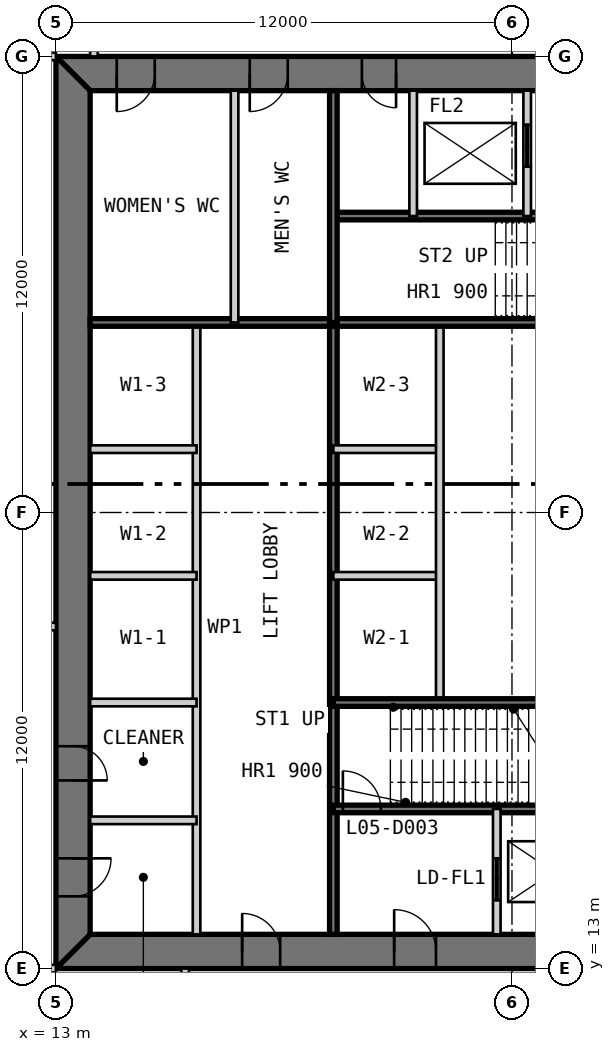
"""IFC4 building model, lengths in metres.
Left out: names, types, materials, properties, quantities, classifications, styles, units other than length and angle.
Written with IfcOpenShell. Run it as: python <this file> out.ifc"""

import sys

from ifc_helpers import new_model, si_unit, direction, frame, frame_2d, origin, place, context, subcontext, project, spatial, polyline, rectangle, outline, extrude, element, fill, save


model = new_model("IFC4")
c1 = context("Model", 3, precision=1e-05, world=origin(), true_north=direction((0.0, 1.0)))
c2 = subcontext(c1, "Body", "Model", "MODEL_VIEW")
j1 = project(units=[si_unit("LENGTHUNIT", "METRE"), si_unit("PLANEANGLEUNIT", "RADIAN")], contexts=[c1])
p1 = place(None, origin())
s1 = spatial("IfcSite", under=j1, at=p1, CompositionType="ELEMENT")
p2 = place(p1, origin())
s2 = spatial("IfcBuilding", under=s1, at=p2, CompositionType="ELEMENT")
p3 = place(p2, frame((0.0, 0.0, 26.2)))
s3 = spatial("IfcBuildingStorey", under=s2, at=p3, CompositionType="ELEMENT", Elevation=26.2)
p4 = place(p3, frame((13.0, 13.45, 0.0), z_axis=(0.0, 0.0, 1.0), x_axis=(1.0, 0.0, 0.0)))
e1 = element("IfcWall", 1, at=p4, inside=s3, PredefinedType="SHEAR", context=c2, shape_type="SweptSolid", body=[
    extrude(outline(polyline([(0.0, -0.45), (24.0, -0.45), (23.1, 0.45), (0.9, 0.45), (0.0, -0.45)])), origin(), (0.0, 0.0, 1.0), 4.8),
])
p5 = place(p4, frame((4.9, 0.0, 0.0)))
e2 = element("IfcOpeningElement", 2, at=p5, cuts=e1, PredefinedType="OPENING", context=c2, shape_type="SweptSolid", body=[
    extrude(rectangle(XDim=1.0, YDim=2.2, at=frame_2d((0.5, 1.1))), frame((0.0, 0.46, 0.0), z_axis=(0.0, -1.0, 0.0), x_axis=(1.0, 0.0, 0.0)), (0.0, 0.0, 1.0), 0.92),
])
p6 = place(p4, frame((8.9, 0.0, 0.0)))
e3 = element("IfcOpeningElement", 3, at=p6, cuts=e1, PredefinedType="OPENING", context=c2, shape_type="SweptSolid", body=[
    extrude(rectangle(XDim=1.1, YDim=2.2, at=frame_2d((0.55, 1.1))), frame((0.0, 0.46, 0.0), z_axis=(0.0, -1.0, 0.0), x_axis=(1.0, 0.0, 0.0)), (0.0, 0.0, 1.0), 0.92),
])
p7 = place(p4, frame((15.05, 0.0, 0.0)))
e4 = element("IfcOpeningElement", 4, at=p7, cuts=e1, PredefinedType="OPENING", context=c2, shape_type="SweptSolid", body=[
    extrude(rectangle(XDim=0.9, YDim=2.2, at=frame_2d((0.45, 1.1))), frame((0.0, 0.46, 0.0), z_axis=(0.0, -1.0, 0.0), x_axis=(1.0, 0.0, 0.0)), (0.0, 0.0, 1.0), 0.92),
])
p8 = place(p4, frame((17.9, 0.0, 0.0)))
e5 = element("IfcOpeningElement", 5, at=p8, cuts=e1, PredefinedType="OPENING", context=c2, shape_type="SweptSolid", body=[
    extrude(rectangle(XDim=1.0, YDim=2.2, at=frame_2d((0.5, 1.1))), frame((0.0, 0.46, 0.0), z_axis=(0.0, -1.0, 0.0), x_axis=(1.0, 0.0, 0.0)), (0.0, 0.0, 1.0), 0.92),
])
p9 = place(p4, frame((21.4, 0.0, 0.0)))
e6 = element("IfcOpeningElement", 6, at=p9, cuts=e1, PredefinedType="OPENING", context=c2, shape_type="SweptSolid", body=[
    extrude(rectangle(XDim=1.0, YDim=2.2, at=frame_2d((0.5, 1.1))), frame((0.0, 0.46, 0.0), z_axis=(0.0, -1.0, 0.0), x_axis=(1.0, 0.0, 0.0)), (0.0, 0.0, 1.0), 0.92),
])
p10 = place(p3, frame((37.0, 36.55, 0.0), z_axis=(0.0, 0.0, 1.0), x_axis=(-1.0, 0.0, 0.0)))
e7 = element("IfcWall", 7, at=p10, inside=s3, PredefinedType="SHEAR", context=c2, shape_type="SweptSolid", body=[
    extrude(outline(polyline([(0.0, -0.45), (24.0, -0.45), (23.1, 0.45), (0.9, 0.45), (0.0, -0.45)])), origin(), (0.0, 0.0, 1.0), 4.8),
])
p11 = place(p10, frame((4.9, 0.0, 0.0)))
e8 = element("IfcOpeningElement", 8, at=p11, cuts=e7, PredefinedType="OPENING", context=c2, shape_type="SweptSolid", body=[
    extrude(rectangle(XDim=1.0, YDim=2.2, at=frame_2d((0.5, 1.1))), frame((0.0, 0.46, 0.0), z_axis=(0.0, -1.0, 0.0), x_axis=(1.0, 0.0, 0.0)), (0.0, 0.0, 1.0), 0.92),
])
p12 = place(p10, frame((8.9, 0.0, 0.0)))
e9 = element("IfcOpeningElement", 9, at=p12, cuts=e7, PredefinedType="OPENING", context=c2, shape_type="SweptSolid", body=[
    extrude(rectangle(XDim=1.1, YDim=2.2, at=frame_2d((0.55, 1.1))), frame((0.0, 0.46, 0.0), z_axis=(0.0, -1.0, 0.0), x_axis=(1.0, 0.0, 0.0)), (0.0, 0.0, 1.0), 0.92),
])
p13 = place(p10, frame((15.05, 0.0, 0.0)))
e10 = element("IfcOpeningElement", 10, at=p13, cuts=e7, PredefinedType="OPENING", context=c2, shape_type="SweptSolid", body=[
    extrude(rectangle(XDim=0.9, YDim=2.2, at=frame_2d((0.45, 1.1))), frame((0.0, 0.46, 0.0), z_axis=(0.0, -1.0, 0.0), x_axis=(1.0, 0.0, 0.0)), (0.0, 0.0, 1.0), 0.92),
])
p14 = place(p10, frame((17.9, 0.0, 0.0)))
e11 = element("IfcOpeningElement", 11, at=p14, cuts=e7, PredefinedType="OPENING", context=c2, shape_type="SweptSolid", body=[
    extrude(rectangle(XDim=1.0, YDim=2.2, at=frame_2d((0.5, 1.1))), frame((0.0, 0.46, 0.0), z_axis=(0.0, -1.0, 0.0), x_axis=(1.0, 0.0, 0.0)), (0.0, 0.0, 1.0), 0.92),
])
p15 = place(p10, frame((21.4, 0.0, 0.0)))
e12 = element("IfcOpeningElement", 12, at=p15, cuts=e7, PredefinedType="OPENING", context=c2, shape_type="SweptSolid", body=[
    extrude(rectangle(XDim=1.0, YDim=2.2, at=frame_2d((0.5, 1.1))), frame((0.0, 0.46, 0.0), z_axis=(0.0, -1.0, 0.0), x_axis=(1.0, 0.0, 0.0)), (0.0, 0.0, 1.0), 0.92),
])
p16 = place(p3, frame((13.45, 36.1, 0.0), z_axis=(0.0, 0.0, 1.0), x_axis=(0.0, -1.0, 0.0)))
e13 = element("IfcWall", 13, at=p16, inside=s3, PredefinedType="SHEAR", context=c2, shape_type="SweptSolid", body=[
    extrude(outline(polyline([(-0.9, -0.45), (23.1, -0.45), (22.2, 0.45), (0.0, 0.45), (-0.9, -0.45)])), origin(), (0.0, 0.0, 1.0), 4.8),
])
p17 = place(p16, frame((20.2, 0.0, 0.0)))
e14 = element("IfcOpeningElement", 14, at=p17, cuts=e13, PredefinedType="OPENING", context=c2, shape_type="SweptSolid", body=[
    extrude(rectangle(XDim=1.0, YDim=2.2, at=frame_2d((0.5, 1.1))), frame((0.0, 0.46, 0.0), z_axis=(0.0, -1.0, 0.0), x_axis=(1.0, 0.0, 0.0)), (0.0, 0.0, 1.0), 0.92),
])
p18 = place(p16, frame((17.25, 0.0, 0.0)))
e15 = element("IfcOpeningElement", 15, at=p18, cuts=e13, PredefinedType="OPENING", context=c2, shape_type="SweptSolid", body=[
    extrude(rectangle(XDim=0.9, YDim=2.2, at=frame_2d((0.45, 1.1))), frame((0.0, 0.46, 0.0), z_axis=(0.0, -1.0, 0.0), x_axis=(1.0, 0.0, 0.0)), (0.0, 0.0, 1.0), 0.92),
])
p19 = place(p3, frame((16.7, 13.9, 0.0), z_axis=(0.0, 0.0, 1.0), x_axis=(0.0, 1.0, 0.0)))
e16 = element("IfcWall", 16, at=p19, inside=s3, PredefinedType="PARTITIONING", context=c2, shape_type="SweptSolid", body=[
    extrude(rectangle(XDim=16.1, YDim=0.2, at=frame_2d((8.05, 0.0))), origin(), (0.0, 0.0, 1.0), 4.6),
])
p20 = place(p3, frame((20.3, 13.9, 0.0), z_axis=(0.0, 0.0, 1.0), x_axis=(0.0, 1.0, 0.0)))
e17 = element("IfcWall", 17, at=p20, inside=s3, PredefinedType="SOLIDWALL", context=c2, shape_type="SweptSolid", body=[
    extrude(rectangle(XDim=16.1, YDim=0.2, at=frame_2d((8.05, 0.0))), origin(), (0.0, 0.0, 1.0), 4.6),
])
for number, where, z_axis, x_axis in (
    (18, (13.9, 20.0, 0.0), (0.0, 0.0, 1.0), (1.0, 0.0, 0.0)),
    (19, (13.9, 23.333, 0.0), (0.0, 0.0, 1.0), (1.0, 0.0, 0.0)),
    (20, (13.9, 26.667, 0.0), (0.0, 0.0, 1.0), (1.0, 0.0, 0.0)),
    (21, (20.3, 23.333, 0.0), (0.0, 0.0, 1.0), (1.0, 0.0, 0.0)),
    (22, (20.3, 26.667, 0.0), (0.0, 0.0, 1.0), (1.0, 0.0, 0.0)),
):
    element("IfcWall", number, at=place(p3, frame(where, z_axis=z_axis, x_axis=x_axis)), inside=s3, PredefinedType="PARTITIONING", context=c2, shape_type="SweptSolid", body=[
        extrude(rectangle(XDim=2.8, YDim=0.2, at=frame_2d((1.4, 0.0))), origin(), (0.0, 0.0, 1.0), 4.6),
    ])
p21 = place(p3, frame((23.1, 20.0, 0.0), z_axis=(0.0, 0.0, 1.0), x_axis=(0.0, 1.0, 0.0)))
e23 = element("IfcWall", 23, at=p21, inside=s3, PredefinedType="PARTITIONING", context=c2, shape_type="SweptSolid", body=[
    extrude(rectangle(XDim=10.0, YDim=0.2, at=frame_2d((5.0, 0.0))), origin(), (0.0, 0.0, 1.0), 4.6),
])
p22 = place(p3, frame((20.3, 17.2, 0.0), z_axis=(0.0, 0.0, 1.0), x_axis=(1.0, 0.0, 0.0)))
e24 = element("IfcWall", 24, at=p22, inside=s3, PredefinedType="SOLIDWALL", context=c2, shape_type="SweptSolid", body=[
    extrude(rectangle(XDim=9.4, YDim=0.2, at=frame_2d((4.7, 0.0))), origin(), (0.0, 0.0, 1.0), 4.6),
])
p23 = place(p22, frame((0.25, 0.0, 0.0)))
e25 = element("IfcOpeningElement", 25, at=p23, cuts=e24, PredefinedType="OPENING", context=c2, shape_type="SweptSolid", body=[
    extrude(rectangle(XDim=1.0, YDim=2.2, at=frame_2d((0.5, 1.1))), frame((0.0, 0.11, 0.0), z_axis=(0.0, -1.0, 0.0), x_axis=(1.0, 0.0, 0.0)), (0.0, 0.0, 1.0), 0.22),
])
p24 = place(p3, frame((20.3, 20.0, 0.0), z_axis=(0.0, 0.0, 1.0), x_axis=(1.0, 0.0, 0.0)))
e26 = element("IfcWall", 26, at=p24, inside=s3, PredefinedType="SOLIDWALL", context=c2, shape_type="SweptSolid", body=[
    extrude(rectangle(XDim=15.8, YDim=0.2, at=frame_2d((7.9, 0.0))), origin(), (0.0, 0.0, 1.0), 4.6),
])
p25 = place(p3, frame((24.6, 13.9, 0.0), z_axis=(0.0, 0.0, 1.0), x_axis=(0.0, 1.0, 0.0)))
e27 = element("IfcWall", 27, at=p25, inside=s3, PredefinedType="PARTITIONING", context=c2, shape_type="SweptSolid", body=[
    extrude(rectangle(XDim=3.3, YDim=0.2, at=frame_2d((1.65, 0.0))), origin(), (0.0, 0.0, 1.0), 4.6),
])
p26 = place(p25, frame((0.9, 0.0, 0.0)))
e28 = element("IfcOpeningElement", 28, at=p26, cuts=e27, PredefinedType="OPENING", context=c2, shape_type="SweptSolid", body=[
    extrude(rectangle(XDim=1.1, YDim=2.2, at=frame_2d((0.55, 1.1))), frame((0.0, 0.11, 0.0), z_axis=(0.0, -1.0, 0.0), x_axis=(1.0, 0.0, 0.0)), (0.0, 0.0, 1.0), 0.22),
])
p27 = place(p3, frame((13.9, 16.9, 0.0), z_axis=(0.0, 0.0, 1.0), x_axis=(1.0, 0.0, 0.0)))
e29 = element("IfcWall", 29, at=p27, inside=s3, PredefinedType="PARTITIONING", context=c2, shape_type="SweptSolid", body=[
    extrude(rectangle(XDim=2.8, YDim=0.2, at=frame_2d((1.4, 0.0))), origin(), (0.0, 0.0, 1.0), 4.6),
])
p28 = place(p3, frame((29.7, 32.8, 0.0), z_axis=(0.0, 0.0, 1.0), x_axis=(-1.0, 0.0, 0.0)))
e30 = element("IfcWall", 30, at=p28, inside=s3, PredefinedType="SOLIDWALL", context=c2, shape_type="SweptSolid", body=[
    extrude(rectangle(XDim=9.4, YDim=0.2, at=frame_2d((4.7, 0.0))), origin(), (0.0, 0.0, 1.0), 4.6),
])
p29 = place(p28, frame((0.25, 0.0, 0.0)))
e31 = element("IfcOpeningElement", 31, at=p29, cuts=e30, PredefinedType="OPENING", context=c2, shape_type="SweptSolid", body=[
    extrude(rectangle(XDim=1.0, YDim=2.2, at=frame_2d((0.5, 1.1))), frame((0.0, 0.11, 0.0), z_axis=(0.0, -1.0, 0.0), x_axis=(1.0, 0.0, 0.0)), (0.0, 0.0, 1.0), 0.22),
])
p30 = place(p3, frame((29.7, 30.0, 0.0), z_axis=(0.0, 0.0, 1.0), x_axis=(-1.0, 0.0, 0.0)))
e32 = element("IfcWall", 32, at=p30, inside=s3, PredefinedType="SOLIDWALL", context=c2, shape_type="SweptSolid", body=[
    extrude(rectangle(XDim=15.8, YDim=0.2, at=frame_2d((7.9, 0.0))), origin(), (0.0, 0.0, 1.0), 4.6),
])
p31 = place(p3, frame((25.4, 36.1, 0.0), z_axis=(0.0, 0.0, 1.0), x_axis=(0.0, -1.0, 0.0)))
e33 = element("IfcWall", 33, at=p31, inside=s3, PredefinedType="PARTITIONING", context=c2, shape_type="SweptSolid", body=[
    extrude(rectangle(XDim=3.3, YDim=0.2, at=frame_2d((1.65, 0.0))), origin(), (0.0, 0.0, 1.0), 4.6),
])
p32 = place(p31, frame((0.9, 0.0, 0.0)))
e34 = element("IfcOpeningElement", 34, at=p32, cuts=e33, PredefinedType="OPENING", context=c2, shape_type="SweptSolid", body=[
    extrude(rectangle(XDim=1.1, YDim=2.2, at=frame_2d((0.55, 1.1))), frame((0.0, 0.11, 0.0), z_axis=(0.0, -1.0, 0.0), x_axis=(1.0, 0.0, 0.0)), (0.0, 0.0, 1.0), 0.22),
])
p33 = place(p3, frame((22.4, 36.1, 0.0), z_axis=(0.0, 0.0, 1.0), x_axis=(0.0, -1.0, 0.0)))
e35 = element("IfcWall", 35, at=p33, inside=s3, PredefinedType="PARTITIONING", context=c2, shape_type="SweptSolid", body=[
    extrude(rectangle(XDim=3.3, YDim=0.2, at=frame_2d((1.65, 0.0))), origin(), (0.0, 0.0, 1.0), 4.6),
])
p34 = place(p3, frame((20.3, 36.1, 0.0), z_axis=(0.0, 0.0, 1.0), x_axis=(0.0, -1.0, 0.0)))
e36 = element("IfcWall", 36, at=p34, inside=s3, PredefinedType="SOLIDWALL", context=c2, shape_type="SweptSolid", body=[
    extrude(rectangle(XDim=6.1, YDim=0.2, at=frame_2d((3.05, 0.0))), origin(), (0.0, 0.0, 1.0), 4.6),
])
p35 = place(p3, frame((17.7, 36.1, 0.0), z_axis=(0.0, 0.0, 1.0), x_axis=(0.0, -1.0, 0.0)))
e37 = element("IfcWall", 37, at=p35, inside=s3, PredefinedType="PARTITIONING", context=c2, shape_type="SweptSolid", body=[
    extrude(rectangle(XDim=6.1, YDim=0.2, at=frame_2d((3.05, 0.0))), origin(), (0.0, 0.0, 1.0), 4.6),
])
p36 = place(p3, frame((14.0, 37.0, 0.0), z_axis=(0.0, 0.0, 1.0), x_axis=(0.0, 1.0, 0.0)))
e38 = element("IfcWall", 38, at=p36, inside=s3, PredefinedType="PARTITIONING", context=c2, shape_type="SweptSolid", body=[
    extrude(rectangle(XDim=6.0, YDim=0.2, at=frame_2d((3.0, 0.0))), origin(), (0.0, 0.0, 1.0), 4.5),
])
p37 = place(p36, frame((2.55, 0.0, 0.0)))
e39 = element("IfcOpeningElement", 39, at=p37, cuts=e38, PredefinedType="OPENING", context=c2, shape_type="SweptSolid", body=[
    extrude(rectangle(XDim=0.9, YDim=2.2, at=frame_2d((0.45, 1.1))), frame((0.0, 0.11, 0.0), z_axis=(0.0, -1.0, 0.0), x_axis=(1.0, 0.0, 0.0)), (0.0, 0.0, 1.0), 0.22),
])
p38 = place(p3, frame((16.4, 7.0, 0.0), z_axis=(0.0, 0.0, 1.0), x_axis=(0.0, 1.0, 0.0)))
e40 = element("IfcWall", 40, at=p38, inside=s3, PredefinedType="PARTITIONING", context=c2, shape_type="SweptSolid", body=[
    extrude(rectangle(XDim=6.0, YDim=0.2, at=frame_2d((3.0, 0.0))), origin(), (0.0, 0.0, 1.0), 4.5),
])
p39 = place(p3, frame((7.0, 13.0, 0.0), z_axis=(0.0, 0.0, 1.0), x_axis=(1.0, 0.0, 0.0)))
e41 = element("IfcWall", 41, at=p39, inside=s3, PredefinedType="PARTITIONING", context=c2, shape_type="SweptSolid", body=[
    extrude(rectangle(XDim=6.0, YDim=0.2, at=frame_2d((3.0, 0.0))), origin(), (0.0, 0.0, 1.0), 3.703),
])
p40 = place(p3, frame((7.0, 22.0, 0.0), z_axis=(0.0, 0.0, 1.0), x_axis=(1.0, 0.0, 0.0)))
e42 = element("IfcWall", 42, at=p40, inside=s3, PredefinedType="PARTITIONING", context=c2, shape_type="SweptSolid", body=[
    extrude(rectangle(XDim=6.0, YDim=0.2, at=frame_2d((3.0, 0.0))), origin(), (0.0, 0.0, 1.0), 4.5),
])
p41 = place(p40, frame((2.1, 0.0, 0.0)))
e43 = element("IfcOpeningElement", 43, at=p41, cuts=e42, PredefinedType="OPENING", context=c2, shape_type="SweptSolid", body=[
    extrude(rectangle(XDim=1.8, YDim=2.4, at=frame_2d((0.9, 1.2))), frame((0.0, 0.11, 0.0), z_axis=(0.0, -1.0, 0.0), x_axis=(1.0, 0.0, 0.0)), (0.0, 0.0, 1.0), 0.22),
])
p42 = place(p3, frame((7.0, 37.0, 0.0), z_axis=(0.0, 0.0, 1.0), x_axis=(1.0, 0.0, 0.0)))
e44 = element("IfcWall", 44, at=p42, inside=s3, PredefinedType="PARTITIONING", context=c2, shape_type="SweptSolid", body=[
    extrude(rectangle(XDim=6.0, YDim=0.2, at=frame_2d((3.0, 0.0))), origin(), (0.0, 0.0, 1.0), 3.703),
])
p43 = place(p5, origin())
e45 = element("IfcDoor", 45, at=p43, inside=s3, OperationType="SINGLE_SWING_LEFT", PredefinedType="DOOR", context=c2, shape_type="SweptSolid", body=[
    extrude(rectangle(XDim=1.0, YDim=2.2, at=frame_2d((0.5, 1.1))), frame((0.0, 0.025, 0.0), z_axis=(0.0, -1.0, 0.0), x_axis=(1.0, 0.0, 0.0)), (0.0, 0.0, 1.0), 0.05),
    extrude(outline(polyline([(0.0, 0.0), (0.04, 0.0), (0.04, 2.16), (0.96, 2.16), (0.96, 0.0), (1.0, 0.0), (1.0, 2.2), (0.0, 2.2), (0.0, 0.0)])), frame((0.0, 0.3, 0.0), z_axis=(0.0, -1.0, 0.0), x_axis=(1.0, 0.0, 0.0)), (0.0, 0.0, 1.0), 0.6),
])
fill(e2, e45)
p44 = place(p6, origin())
e46 = element("IfcDoor", 46, at=p44, inside=s3, OperationType="SINGLE_SWING_LEFT", PredefinedType="DOOR", context=c2, shape_type="SweptSolid", body=[
    extrude(rectangle(XDim=1.1, YDim=2.2, at=frame_2d((0.55, 1.1))), frame((0.0, 0.025, 0.0), z_axis=(0.0, -1.0, 0.0), x_axis=(1.0, 0.0, 0.0)), (0.0, 0.0, 1.0), 0.05),
    extrude(outline(polyline([(0.0, 0.0), (0.04, 0.0), (0.04, 2.16), (1.06, 2.16), (1.06, 0.0), (1.1, 0.0), (1.1, 2.2), (0.0, 2.2), (0.0, 0.0)])), frame((0.0, 0.3, 0.0), z_axis=(0.0, -1.0, 0.0), x_axis=(1.0, 0.0, 0.0)), (0.0, 0.0, 1.0), 0.6),
])
fill(e3, e46)
p45 = place(p23, origin())
e47 = element("IfcDoor", 47, at=p45, inside=s3, OperationType="SINGLE_SWING_LEFT", PredefinedType="DOOR", context=c2, shape_type="SweptSolid", body=[
    extrude(rectangle(XDim=1.0, YDim=2.2, at=frame_2d((0.5, 1.1))), frame((0.0, 0.025, 0.0), z_axis=(0.0, -1.0, 0.0), x_axis=(1.0, 0.0, 0.0)), (0.0, 0.0, 1.0), 0.05),
])
fill(e25, e47)
p46 = place(p17, origin())
e48 = element("IfcDoor", 48, at=p46, inside=s3, OperationType="SINGLE_SWING_LEFT", PredefinedType="DOOR", context=c2, shape_type="SweptSolid", body=[
    extrude(rectangle(XDim=1.0, YDim=2.2, at=frame_2d((0.5, 1.1))), frame((0.0, 0.025, 0.0), z_axis=(0.0, -1.0, 0.0), x_axis=(1.0, 0.0, 0.0)), (0.0, 0.0, 1.0), 0.05),
    extrude(outline(polyline([(0.0, 0.0), (0.04, 0.0), (0.04, 2.16), (0.96, 2.16), (0.96, 0.0), (1.0, 0.0), (1.0, 2.2), (0.0, 2.2), (0.0, 0.0)])), frame((0.0, 0.3, 0.0), z_axis=(0.0, -1.0, 0.0), x_axis=(1.0, 0.0, 0.0)), (0.0, 0.0, 1.0), 0.6),
])
fill(e14, e48)
p47 = place(p18, origin())
e49 = element("IfcDoor", 49, at=p47, inside=s3, OperationType="SINGLE_SWING_RIGHT", PredefinedType="DOOR", context=c2, shape_type="SweptSolid", body=[
    extrude(rectangle(XDim=0.9, YDim=2.2, at=frame_2d((0.45, 1.1))), frame((0.0, 0.025, 0.0), z_axis=(0.0, -1.0, 0.0), x_axis=(1.0, 0.0, 0.0)), (0.0, 0.0, 1.0), 0.05),
    extrude(outline(polyline([(0.0, 0.0), (0.04, 0.0), (0.04, 2.16), (0.86, 2.16), (0.86, 0.0), (0.9, 0.0), (0.9, 2.2), (0.0, 2.2), (0.0, 0.0)])), frame((0.0, 0.3, 0.0), z_axis=(0.0, -1.0, 0.0), x_axis=(1.0, 0.0, 0.0)), (0.0, 0.0, 1.0), 0.6),
])
fill(e15, e49)
p48 = place(p13, origin())
e50 = element("IfcDoor", 50, at=p48, inside=s3, OperationType="SINGLE_SWING_LEFT", PredefinedType="DOOR", context=c2, shape_type="SweptSolid", body=[
    extrude(rectangle(XDim=0.9, YDim=2.2, at=frame_2d((0.45, 1.1))), frame((0.0, 0.025, 0.0), z_axis=(0.0, -1.0, 0.0), x_axis=(1.0, 0.0, 0.0)), (0.0, 0.0, 1.0), 0.05),
    extrude(outline(polyline([(0.0, 0.0), (0.04, 0.0), (0.04, 2.16), (0.86, 2.16), (0.86, 0.0), (0.9, 0.0), (0.9, 2.2), (0.0, 2.2), (0.0, 0.0)])), frame((0.0, 0.3, 0.0), z_axis=(0.0, -1.0, 0.0), x_axis=(1.0, 0.0, 0.0)), (0.0, 0.0, 1.0), 0.6),
])
fill(e10, e50)
p49 = place(p14, origin())
e51 = element("IfcDoor", 51, at=p49, inside=s3, OperationType="SINGLE_SWING_RIGHT", PredefinedType="DOOR", context=c2, shape_type="SweptSolid", body=[
    extrude(rectangle(XDim=1.0, YDim=2.2, at=frame_2d((0.5, 1.1))), frame((0.0, 0.025, 0.0), z_axis=(0.0, -1.0, 0.0), x_axis=(1.0, 0.0, 0.0)), (0.0, 0.0, 1.0), 0.05),
    extrude(outline(polyline([(0.0, 0.0), (0.04, 0.0), (0.04, 2.16), (0.96, 2.16), (0.96, 0.0), (1.0, 0.0), (1.0, 2.2), (0.0, 2.2), (0.0, 0.0)])), frame((0.0, 0.3, 0.0), z_axis=(0.0, -1.0, 0.0), x_axis=(1.0, 0.0, 0.0)), (0.0, 0.0, 1.0), 0.6),
])
fill(e11, e51)
p50 = place(p15, origin())
e52 = element("IfcDoor", 52, at=p50, inside=s3, OperationType="SINGLE_SWING_RIGHT", PredefinedType="DOOR", context=c2, shape_type="SweptSolid", body=[
    extrude(rectangle(XDim=1.0, YDim=2.2, at=frame_2d((0.5, 1.1))), frame((0.0, 0.025, 0.0), z_axis=(0.0, -1.0, 0.0), x_axis=(1.0, 0.0, 0.0)), (0.0, 0.0, 1.0), 0.05),
    extrude(outline(polyline([(0.0, 0.0), (0.04, 0.0), (0.04, 2.16), (0.96, 2.16), (0.96, 0.0), (1.0, 0.0), (1.0, 2.2), (0.0, 2.2), (0.0, 0.0)])), frame((0.0, 0.3, 0.0), z_axis=(0.0, -1.0, 0.0), x_axis=(1.0, 0.0, 0.0)), (0.0, 0.0, 1.0), 0.6),
])
fill(e12, e52)
p51 = place(p26, origin())
e53 = element("IfcDoor", 53, at=p51, inside=s3, OperationType="DOUBLE_DOOR_SLIDING", PredefinedType="DOOR", context=c2, shape_type="SweptSolid", body=[
    extrude(rectangle(XDim=1.1, YDim=2.2, at=frame_2d((0.55, 1.1))), frame((0.0, 0.025, 0.0), z_axis=(0.0, -1.0, 0.0), x_axis=(1.0, 0.0, 0.0)), (0.0, 0.0, 1.0), 0.05),
])
fill(e28, e53)
p52 = place(p32, origin())
e54 = element("IfcDoor", 54, at=p52, inside=s3, OperationType="DOUBLE_DOOR_SLIDING", PredefinedType="DOOR", context=c2, shape_type="SweptSolid", body=[
    extrude(rectangle(XDim=1.1, YDim=2.2, at=frame_2d((0.55, 1.1))), frame((0.0, 0.025, 0.0), z_axis=(0.0, -1.0, 0.0), x_axis=(1.0, 0.0, 0.0)), (0.0, 0.0, 1.0), 0.05),
])
fill(e34, e54)
save(model, sys.argv[1])
